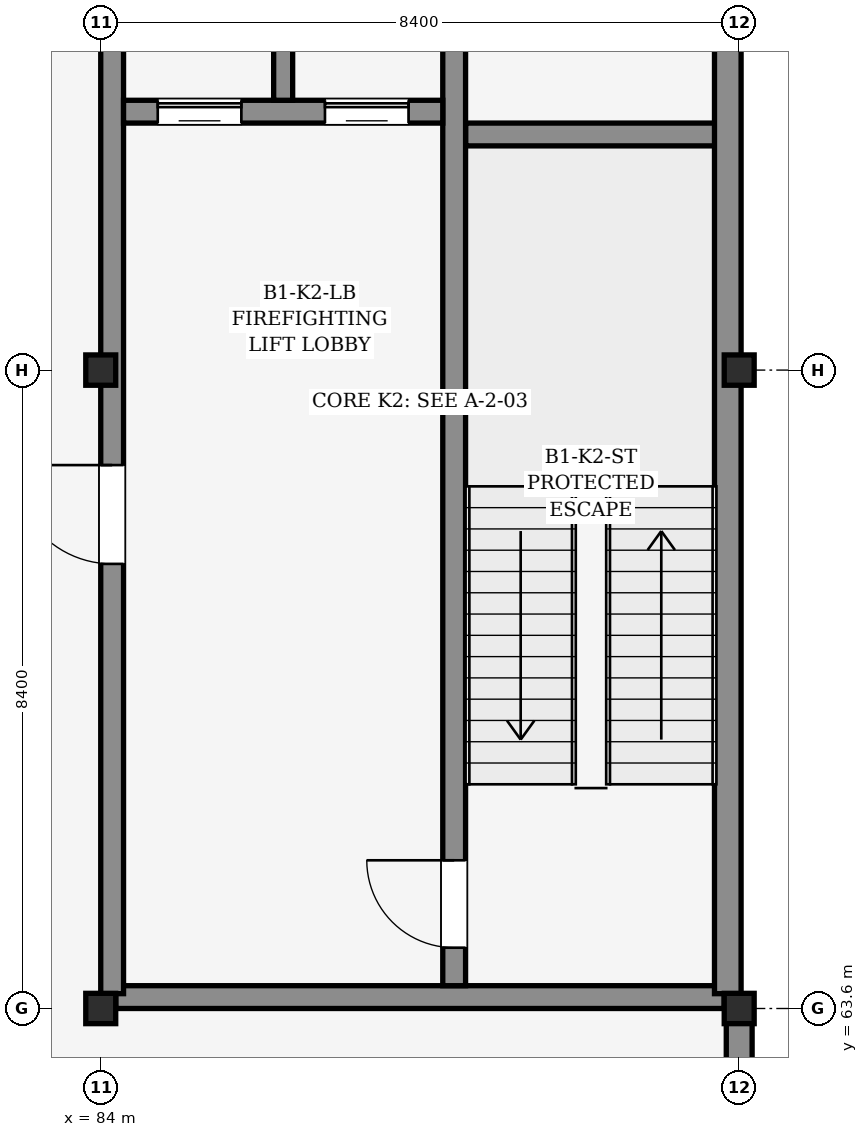
"""IFC4 building model, lengths in metres.
Left out: names, types, materials, properties, quantities, classifications, styles, units other than length and angle.
Written with IfcOpenShell. Run it as: python <this file> out.ifc"""

import sys

from ifc_helpers import new_model, si_unit, direction, frame, frame_2d, origin, origin_2d, place, context, subcontext, project, spatial, rectangle, i_section, extrude, element, fill, save


model = new_model("IFC4")
c1 = context("Model", 3, precision=1e-05, world=origin(), true_north=direction((0.0, 1.0)))
c2 = subcontext(c1, "Body", "Model", "MODEL_VIEW")
j1 = project(units=[si_unit("LENGTHUNIT", "METRE"), si_unit("PLANEANGLEUNIT", "RADIAN")], contexts=[c1])
p1 = place(None, origin())
s1 = spatial("IfcSite", under=j1, at=p1, CompositionType="ELEMENT")
p2 = place(p1, origin())
s2 = spatial("IfcBuilding", under=s1, at=p2, CompositionType="ELEMENT")
p3 = place(p2, frame((0.0, 0.0, -5.4)))
s3 = spatial("IfcBuildingStorey", under=s2, at=p3, CompositionType="ELEMENT", Elevation=-5.4)
for number, where, z_axis, x_axis in (
    (1, (84.0, 63.6, 0.0), (0.0, 0.0, 1.0), (1.0, 0.0, 0.0)),
    (2, (84.0, 72.0, 0.0), (0.0, 0.0, 1.0), (1.0, 0.0, 0.0)),
    (3, (92.4, 63.6, 0.0), (0.0, 0.0, 1.0), (1.0, 0.0, 0.0)),
    (4, (92.4, 72.0, 0.0), (0.0, 0.0, 1.0), (1.0, 0.0, 0.0)),
):
    element("IfcColumn", number, at=place(p3, frame(where, z_axis=z_axis, x_axis=x_axis)), inside=s3, PredefinedType="COLUMN", context=c2, shape_type="SweptSolid", body=[
        extrude(i_section(OverallWidth=0.399, OverallDepth=0.394, WebThickness=0.023, FlangeThickness=0.037, FilletRadius=0.015, at=origin_2d()), origin(), (0.0, 0.0, 1.0), 5.4),
    ])
p4 = place(p3, frame((92.4, 55.395, 0.0), z_axis=(0.0, 0.0, 1.0), x_axis=(0.0, 1.0, 0.0)))
e5 = element("IfcWall", 5, at=p4, inside=s3, PredefinedType="USERDEFINED", context=c2, shape_type="SweptSolid", body=[
    extrude(rectangle(XDim=8.01, YDim=0.34, at=frame_2d((4.005, 0.0))), origin(), (0.0, 0.0, 1.0), 4.06),
])
p5 = place(p3, frame((84.198, 63.75, 0.0), z_axis=(0.0, 0.0, 1.0), x_axis=(1.0, 0.0, 0.0)))
e6 = element("IfcWall", 6, at=p5, inside=s3, PredefinedType="SHEAR", context=c2, shape_type="SweptSolid", body=[
    extrude(rectangle(XDim=8.005, YDim=0.3, at=frame_2d((4.002, 0.0))), origin(), (0.0, 0.0, 1.0), 5.12),
])
p6 = place(p3, frame((88.8, 75.1, 0.0), z_axis=(0.0, 0.0, 1.0), x_axis=(1.0, 0.0, 0.0)))
e7 = element("IfcWall", 7, at=p6, inside=s3, PredefinedType="SHEAR", context=c2, shape_type="SweptSolid", body=[
    extrude(rectangle(XDim=3.3, YDim=0.3, at=frame_2d((1.65, 0.0))), origin(), (0.0, 0.0, 1.0), 5.12),
])
p7 = place(p3, frame((92.25, 63.795, 0.0), z_axis=(0.0, 0.0, 1.0), x_axis=(0.0, 1.0, 0.0)))
e8 = element("IfcWall", 8, at=p7, inside=s3, PredefinedType="SHEAR", context=c2, shape_type="SweptSolid", body=[
    extrude(rectangle(XDim=16.41, YDim=0.35, at=frame_2d((8.205, 0.0))), origin(), (0.0, 0.0, 1.0), 5.12),
])
p8 = place(p3, frame((84.15, 63.795, 0.0), z_axis=(0.0, 0.0, 1.0), x_axis=(0.0, 1.0, 0.0)))
e9 = element("IfcWall", 9, at=p8, inside=s3, PredefinedType="SHEAR", context=c2, shape_type="SweptSolid", body=[
    extrude(rectangle(XDim=16.41, YDim=0.3, at=frame_2d((8.205, 0.0))), origin(), (0.0, 0.0, 1.0), 5.12),
])
p9 = place(p8, frame((5.655, 0.0, 0.0)))
e10 = element("IfcOpeningElement", 10, at=p9, cuts=e9, PredefinedType="OPENING", context=c2, shape_type="SweptSolid", body=[
    extrude(rectangle(XDim=1.3, YDim=2.2, at=frame_2d((0.65, 1.1))), frame((0.0, 0.16, 0.0), z_axis=(0.0, -1.0, 0.0), x_axis=(1.0, 0.0, 0.0)), (0.0, 0.0, 1.0), 0.32),
])
p10 = place(p3, frame((88.65, 63.9, 0.0), z_axis=(0.0, 0.0, 1.0), x_axis=(0.0, 1.0, 0.0)))
e11 = element("IfcWall", 11, at=p10, inside=s3, PredefinedType="SHEAR", context=c2, shape_type="SweptSolid", body=[
    extrude(rectangle(XDim=16.2, YDim=0.3, at=frame_2d((8.1, 0.0))), origin(), (0.0, 0.0, 1.0), 5.12),
])
p11 = place(p10, frame((0.5, 0.0, 0.0)))
e12 = element("IfcOpeningElement", 12, at=p11, cuts=e11, PredefinedType="OPENING", context=c2, shape_type="SweptSolid", body=[
    extrude(rectangle(XDim=1.15, YDim=2.15, at=frame_2d((0.575, 1.075))), frame((0.0, 0.16, 0.0), z_axis=(0.0, -1.0, 0.0), x_axis=(1.0, 0.0, 0.0)), (0.0, 0.0, 1.0), 0.32),
])
p12 = place(p3, frame((84.3, 75.4, 0.0), z_axis=(0.0, 0.0, 1.0), x_axis=(1.0, 0.0, 0.0)))
e13 = element("IfcWall", 13, at=p12, inside=s3, PredefinedType="SHEAR", context=c2, shape_type="SweptSolid", body=[
    extrude(rectangle(XDim=4.2, YDim=0.3, at=frame_2d((2.1, 0.0))), origin(), (0.0, 0.0, 1.0), 5.12),
])
p13 = place(p12, frame((0.45, 0.0, 0.0)))
e14 = element("IfcOpeningElement", 14, at=p13, cuts=e13, PredefinedType="OPENING", context=c2, shape_type="SweptSolid", body=[
    extrude(rectangle(XDim=1.1, YDim=2.2, at=frame_2d((0.55, 1.1))), frame((0.0, 0.16, 0.0), z_axis=(0.0, -1.0, 0.0), x_axis=(1.0, 0.0, 0.0)), (0.0, 0.0, 1.0), 0.32),
])
p14 = place(p12, frame((2.65, 0.0, 0.0)))
e15 = element("IfcOpeningElement", 15, at=p14, cuts=e13, PredefinedType="OPENING", context=c2, shape_type="SweptSolid", body=[
    extrude(rectangle(XDim=1.1, YDim=2.2, at=frame_2d((0.55, 1.1))), frame((0.0, 0.16, 0.0), z_axis=(0.0, -1.0, 0.0), x_axis=(1.0, 0.0, 0.0)), (0.0, 0.0, 1.0), 0.32),
])
p15 = place(p3, frame((86.4, 75.55, 0.0), z_axis=(0.0, 0.0, 1.0), x_axis=(0.0, 1.0, 0.0)))
e16 = element("IfcWall", 16, at=p15, inside=s3, PredefinedType="PARTITIONING", context=c2, shape_type="SweptSolid", body=[
    extrude(rectangle(XDim=4.55, YDim=0.25, at=frame_2d((2.275, 0.0))), origin(), (0.0, 0.0, 1.0), 4.025),
])
p16 = place(p9, origin())
e17 = element("IfcDoor", 17, at=p16, inside=s3, OperationType="SINGLE_SWING_RIGHT", PredefinedType="DOOR", context=c2, shape_type="SweptSolid", body=[
    extrude(rectangle(XDim=1.3, YDim=2.2, at=frame_2d((0.65, 1.1))), frame((0.0, 0.025, 0.0), z_axis=(0.0, -1.0, 0.0), x_axis=(1.0, 0.0, 0.0)), (0.0, 0.0, 1.0), 0.05),
])
fill(e10, e17)
p17 = place(p11, origin())
e18 = element("IfcDoor", 18, at=p17, inside=s3, OperationType="SINGLE_SWING_RIGHT", PredefinedType="DOOR", context=c2, shape_type="SweptSolid", body=[
    extrude(rectangle(XDim=1.15, YDim=2.15, at=frame_2d((0.575, 1.075))), frame((0.0, 0.025, 0.0), z_axis=(0.0, -1.0, 0.0), x_axis=(1.0, 0.0, 0.0)), (0.0, 0.0, 1.0), 0.05),
])
fill(e12, e18)
p18 = place(p13, origin())
e19 = element("IfcDoor", 19, at=p18, inside=s3, OperationType="SLIDING_TO_LEFT", PredefinedType="DOOR", context=c2, shape_type="SweptSolid", body=[
    extrude(rectangle(XDim=1.1, YDim=2.2, at=frame_2d((0.55, 1.1))), frame((0.0, 0.025, 0.0), z_axis=(0.0, -1.0, 0.0), x_axis=(1.0, 0.0, 0.0)), (0.0, 0.0, 1.0), 0.05),
])
fill(e14, e19)
p19 = place(p14, origin())
e20 = element("IfcDoor", 20, at=p19, inside=s3, OperationType="SLIDING_TO_LEFT", PredefinedType="DOOR", context=c2, shape_type="SweptSolid", body=[
    extrude(rectangle(XDim=1.1, YDim=2.2, at=frame_2d((0.55, 1.1))), frame((0.0, 0.025, 0.0), z_axis=(0.0, -1.0, 0.0), x_axis=(1.0, 0.0, 0.0)), (0.0, 0.0, 1.0), 0.05),
])
fill(e15, e20)
save(model, sys.argv[1])
